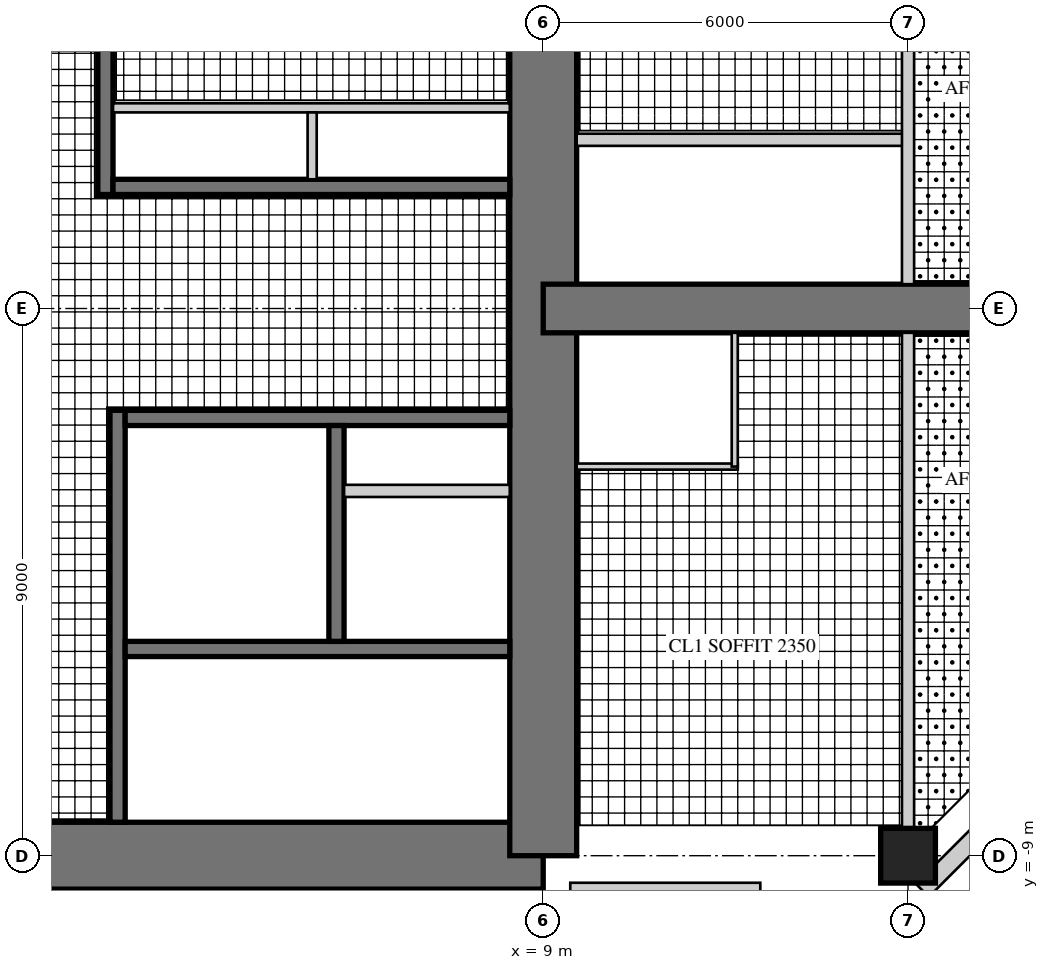
"""IFC4 building model, lengths in metres.
Left out: names, types, materials, properties, quantities, classifications, styles, units other than length and angle.
Written with IfcOpenShell. Run it as: python <this file> out.ifc"""

import sys

from ifc_helpers import new_model, si_unit, direction, frame, frame_2d, origin, origin_2d, place, context, subcontext, project, spatial, rectangle, hollow_rectangle, extrude, element, fill, save


model = new_model("IFC4")
c1 = context("Model", 3, precision=1e-05, world=origin(), true_north=direction((0.0, 1.0)))
c2 = subcontext(c1, "Body", "Model", "MODEL_VIEW")
j1 = project(units=[si_unit("LENGTHUNIT", "METRE"), si_unit("PLANEANGLEUNIT", "RADIAN")], contexts=[c1])
p1 = place(None, origin())
s1 = spatial("IfcSite", under=j1, at=p1, CompositionType="ELEMENT")
p2 = place(p1, origin())
s2 = spatial("IfcBuilding", under=s1, at=p2, CompositionType="ELEMENT")
p3 = place(p2, frame((0.0, 0.0, 189.9)))
s3 = spatial("IfcBuildingStorey", under=s2, at=p3, CompositionType="ELEMENT", Elevation=189.9)
p4 = place(p3, frame((-9.0, -9.0, 0.0), z_axis=(0.0, 0.0, 1.0), x_axis=(1.0, 0.0, 0.0)))
e1 = element("IfcWall", 1, at=p4, inside=s3, PredefinedType="SHEAR", context=c2, shape_type="SweptSolid", body=[
    extrude(rectangle(XDim=18.0, YDim=1.1, at=frame_2d((9.0, 0.0))), origin(), (0.0, 0.0, 1.0), 3.4),
])
p5 = place(p4, frame((9.8, 0.0, 0.0)))
e2 = element("IfcOpeningElement", 2, at=p5, cuts=e1, PredefinedType="OPENING", context=c2, shape_type="SweptSolid", body=[
    extrude(rectangle(XDim=1.0, YDim=2.4, at=frame_2d((0.5, 1.2))), frame((0.0, 0.56, 0.0), z_axis=(0.0, -1.0, 0.0), x_axis=(1.0, 0.0, 0.0)), (0.0, 0.0, 1.0), 1.12),
])
p6 = place(p3, frame((9.0, -9.0, 0.0), z_axis=(0.0, 0.0, 1.0), x_axis=(0.0, 1.0, 0.0)))
e3 = element("IfcWall", 3, at=p6, inside=s3, PredefinedType="SHEAR", context=c2, shape_type="SweptSolid", body=[
    extrude(rectangle(XDim=18.0, YDim=1.1, at=frame_2d((9.0, 0.0))), origin(), (0.0, 0.0, 1.0), 3.4),
])
p7 = place(p6, frame((9.8, 0.0, 0.0)))
e4 = element("IfcOpeningElement", 4, at=p7, cuts=e3, PredefinedType="OPENING", context=c2, shape_type="SweptSolid", body=[
    extrude(rectangle(XDim=1.0, YDim=2.4, at=frame_2d((0.5, 1.2))), frame((0.0, 0.56, 0.0), z_axis=(0.0, -1.0, 0.0), x_axis=(1.0, 0.0, 0.0)), (0.0, 0.0, 1.0), 1.12),
])
p8 = place(p3, frame((1.8, 1.875, 0.0), z_axis=(0.0, 0.0, 1.0), x_axis=(0.0, 1.0, 0.0)))
e5 = element("IfcWall", 5, at=p8, inside=s3, PredefinedType="SHEAR", context=c2, shape_type="SweptSolid", body=[
    extrude(rectangle(XDim=6.575, YDim=0.25, at=frame_2d((3.288, 0.0))), origin(), (0.0, 0.0, 1.0), 3.4),
])
p9 = place(p8, frame((1.875, 0.0, 0.0)))
e6 = element("IfcOpeningElement", 6, at=p9, cuts=e5, PredefinedType="OPENING", context=c2, shape_type="SweptSolid", body=[
    extrude(rectangle(XDim=1.6, YDim=2.4, at=frame_2d((0.8, 1.2))), frame((0.0, 0.135, 0.0), z_axis=(0.0, -1.0, 0.0), x_axis=(1.0, 0.0, 0.0)), (0.0, 0.0, 1.0), 0.27),
])
p10 = place(p3, frame((1.925, 2.0, 0.0), z_axis=(0.0, 0.0, 1.0), x_axis=(1.0, 0.0, 0.0)))
e7 = element("IfcWall", 7, at=p10, inside=s3, PredefinedType="SHEAR", context=c2, shape_type="SweptSolid", body=[
    extrude(rectangle(XDim=6.525, YDim=0.25, at=frame_2d((3.262, 0.0))), origin(), (0.0, 0.0, 1.0), 3.4),
])
p11 = place(p3, frame((1.925, 3.3, 0.0), z_axis=(0.0, 0.0, 1.0), x_axis=(1.0, 0.0, 0.0)))
e8 = element("IfcWall", 8, at=p11, inside=s3, PredefinedType="PARTITIONING", context=c2, shape_type="SweptSolid", body=[
    extrude(rectangle(XDim=6.525, YDim=0.15, at=frame_2d((3.262, 0.0))), origin(), (0.0, 0.0, 1.0), 3.4),
])
p12 = place(p11, frame((0.075, 0.0, 0.0)))
e9 = element("IfcOpeningElement", 9, at=p12, cuts=e8, PredefinedType="OPENING", context=c2, shape_type="SweptSolid", body=[
    extrude(rectangle(XDim=0.8, YDim=2.1, at=frame_2d((0.4, 1.05))), frame((0.0, 0.085, 0.0), z_axis=(0.0, -1.0, 0.0), x_axis=(1.0, 0.0, 0.0)), (0.0, 0.0, 1.0), 0.17),
])
p13 = place(p11, frame((3.675, 0.0, 0.0)))
e10 = element("IfcOpeningElement", 10, at=p13, cuts=e8, PredefinedType="OPENING", context=c2, shape_type="SweptSolid", body=[
    extrude(rectangle(XDim=0.8, YDim=2.1, at=frame_2d((0.4, 1.05))), frame((0.0, 0.085, 0.0), z_axis=(0.0, -1.0, 0.0), x_axis=(1.0, 0.0, 0.0)), (0.0, 0.0, 1.0), 0.17),
])
p14 = place(p3, frame((5.2, 2.125, 0.0), z_axis=(0.0, 0.0, 1.0), x_axis=(0.0, 1.0, 0.0)))
e11 = element("IfcWall", 11, at=p14, inside=s3, PredefinedType="PARTITIONING", context=c2, shape_type="SweptSolid", body=[
    extrude(rectangle(XDim=1.1, YDim=0.15, at=frame_2d((0.55, 0.0))), origin(), (0.0, 0.0, 1.0), 3.4),
])
p15 = place(p3, frame((2.0, -1.675, 0.0), z_axis=(0.0, 0.0, 1.0), x_axis=(0.0, -1.0, 0.0)))
e12 = element("IfcWall", 12, at=p15, inside=s3, PredefinedType="SHEAR", context=c2, shape_type="SweptSolid", body=[
    extrude(rectangle(XDim=6.775, YDim=0.25, at=frame_2d((3.387, 0.0))), origin(), (0.0, 0.0, 1.0), 3.4),
])
p16 = place(p15, frame((0.725, 0.0, 0.0)))
e13 = element("IfcOpeningElement", 13, at=p16, cuts=e12, PredefinedType="OPENING", context=c2, shape_type="SweptSolid", body=[
    extrude(rectangle(XDim=1.0, YDim=2.1, at=frame_2d((0.5, 1.05))), frame((0.0, 0.135, 0.0), z_axis=(0.0, -1.0, 0.0), x_axis=(1.0, 0.0, 0.0)), (0.0, 0.0, 1.0), 0.27),
])
p17 = place(p3, frame((2.125, -1.8, 0.0), z_axis=(0.0, 0.0, 1.0), x_axis=(1.0, 0.0, 0.0)))
e14 = element("IfcWall", 14, at=p17, inside=s3, PredefinedType="SHEAR", context=c2, shape_type="SweptSolid", body=[
    extrude(rectangle(XDim=6.325, YDim=0.25, at=frame_2d((3.163, 0.0))), origin(), (0.0, 0.0, 1.0), 3.4),
])
p18 = place(p3, frame((2.125, -5.6, 0.0), z_axis=(0.0, 0.0, 1.0), x_axis=(1.0, 0.0, 0.0)))
e15 = element("IfcWall", 15, at=p18, inside=s3, PredefinedType="SHEAR", context=c2, shape_type="SweptSolid", body=[
    extrude(rectangle(XDim=6.325, YDim=0.25, at=frame_2d((3.163, 0.0))), origin(), (0.0, 0.0, 1.0), 3.4),
])
p19 = place(p18, frame((0.175, 0.0, 0.0)))
e16 = element("IfcOpeningElement", 16, at=p19, cuts=e15, PredefinedType="OPENING", context=c2, shape_type="SweptSolid", body=[
    extrude(rectangle(XDim=1.0, YDim=2.1, at=frame_2d((0.5, 1.05))), frame((0.0, 0.135, 0.0), z_axis=(0.0, -1.0, 0.0), x_axis=(1.0, 0.0, 0.0)), (0.0, 0.0, 1.0), 0.27),
])
p20 = place(p3, frame((5.6, -1.925, 0.0), z_axis=(0.0, 0.0, 1.0), x_axis=(0.0, -1.0, 0.0)))
e17 = element("IfcWall", 17, at=p20, inside=s3, PredefinedType="SHEAR", context=c2, shape_type="SweptSolid", body=[
    extrude(rectangle(XDim=3.55, YDim=0.25, at=frame_2d((1.775, 0.0))), origin(), (0.0, 0.0, 1.0), 3.4),
])
p21 = place(p20, frame((1.525, 0.0, 0.0)))
e18 = element("IfcOpeningElement", 18, at=p21, cuts=e17, PredefinedType="OPENING", context=c2, shape_type="SweptSolid", body=[
    extrude(rectangle(XDim=1.1, YDim=2.2, at=frame_2d((0.55, 1.1))), frame((0.0, 0.135, 0.0), z_axis=(0.0, -1.0, 0.0), x_axis=(1.0, 0.0, 0.0)), (0.0, 0.0, 1.0), 0.27),
])
p22 = place(p20, frame((0.075, 0.0, 0.0)))
e19 = element("IfcOpeningElement", 19, at=p22, cuts=e17, PredefinedType="OPENING", context=c2, shape_type="SweptSolid", body=[
    extrude(rectangle(XDim=0.8, YDim=2.1, at=frame_2d((0.4, 1.05))), frame((0.0, 0.135, 0.0), z_axis=(0.0, -1.0, 0.0), x_axis=(1.0, 0.0, 0.0)), (0.0, 0.0, 1.0), 0.27),
])
p23 = place(p3, frame((5.725, -3.0, 0.0), z_axis=(0.0, 0.0, 1.0), x_axis=(1.0, 0.0, 0.0)))
e20 = element("IfcWall", 20, at=p23, inside=s3, PredefinedType="PARTITIONING", context=c2, shape_type="SweptSolid", body=[
    extrude(rectangle(XDim=2.725, YDim=0.2, at=frame_2d((1.362, 0.0))), origin(), (0.0, 0.0, 1.0), 3.4),
])
p24 = place(p3, frame((9.0, 0.0, 0.0), z_axis=(0.0, 0.0, 1.0), x_axis=(1.0, 0.0, 0.0)))
e21 = element("IfcWall", 21, at=p24, inside=s3, PredefinedType="SHEAR", context=c2, shape_type="SweptSolid", body=[
    extrude(rectangle(XDim=9.0, YDim=0.8, at=frame_2d((4.5, 0.0))), origin(), (0.0, 0.0, 1.0), 3.4),
])
p25 = place(p24, frame((3.95, 0.0, 0.0)))
e22 = element("IfcOpeningElement", 22, at=p25, cuts=e21, PredefinedType="OPENING", context=c2, shape_type="SweptSolid", body=[
    extrude(rectangle(XDim=1.0, YDim=2.15, at=frame_2d((0.5, 1.075))), frame((0.0, 0.41, 0.0), z_axis=(0.0, -1.0, 0.0), x_axis=(1.0, 0.0, 0.0)), (0.0, 0.0, 1.0), 0.82),
])
p26 = place(p24, frame((7.0, 0.0, 0.0)))
e23 = element("IfcOpeningElement", 23, at=p26, cuts=e21, PredefinedType="OPENING", context=c2, shape_type="SweptSolid", body=[
    extrude(rectangle(XDim=1.0, YDim=2.2, at=frame_2d((0.5, 1.1))), frame((0.0, 0.41, 0.0), z_axis=(0.0, -1.0, 0.0), x_axis=(1.0, 0.0, 0.0)), (0.0, 0.0, 1.0), 0.82),
])
p27 = place(p3, frame((15.0, -9.0, 0.0), z_axis=(0.0, 0.0, 1.0), x_axis=(1.0, 0.0, 0.0)))
e24 = element("IfcColumn", 24, at=p27, inside=s3, PredefinedType="COLUMN", context=c2, shape_type="SweptSolid", body=[
    extrude(rectangle(XDim=0.9, YDim=0.9, at=origin_2d()), origin(), (0.0, 0.0, 1.0), 3.4),
])
p28 = place(p3, frame((9.445, -9.57, 0.0), z_axis=(0.0, 0.0, 1.0), x_axis=(1.0, 0.0, 0.0)))
e25 = element("IfcWall", 25, at=p28, inside=s3, PredefinedType="SOLIDWALL", context=c2, shape_type="SweptSolid", body=[
    extrude(rectangle(XDim=3.125, YDim=0.25, at=frame_2d((1.562, 0.0))), origin(), (0.0, 0.0, 1.0), 3.22),
])
p29 = place(p28, frame((0.6, 0.0, 0.0)))
e26 = element("IfcOpeningElement", 26, at=p29, cuts=e25, PredefinedType="OPENING", context=c2, shape_type="SweptSolid", body=[
    extrude(rectangle(XDim=1.0, YDim=2.2, at=frame_2d((0.5, 1.1))), frame((0.0, 0.135, 0.0), z_axis=(0.0, -1.0, 0.0), x_axis=(1.0, 0.0, 0.0)), (0.0, 0.0, 1.0), 0.27),
])
p30 = place(p3, frame((15.236, -9.57, 0.0), z_axis=(0.0, 0.0, 1.0), x_axis=(0.707106781187, 0.707106781187, 0.0)))
e27 = element("IfcWall", 27, at=p30, inside=s3, PredefinedType="SOLIDWALL", context=c2, shape_type="SweptSolid", body=[
    extrude(rectangle(XDim=4.715, YDim=0.3, at=frame_2d((2.357, 0.0))), origin(), (0.0, 0.0, 1.0), 3.22),
])
p31 = place(p30, frame((1.907, 0.0, 0.3)))
e28 = element("IfcOpeningElement", 28, at=p31, cuts=e27, PredefinedType="OPENING", context=c2, shape_type="SweptSolid", body=[
    extrude(rectangle(XDim=0.9, YDim=2.4, at=frame_2d((0.45, 1.2))), frame((0.0, 0.16, 0.0), z_axis=(0.0, -1.0, 0.0), x_axis=(1.0, 0.0, 0.0)), (0.0, 0.0, 1.0), 0.32),
])
p32 = place(p3, frame((9.55, -2.6, 0.0), z_axis=(0.0, 0.0, 1.0), x_axis=(1.0, 0.0, 0.0)))
e29 = element("IfcWall", 29, at=p32, inside=s3, PredefinedType="PARTITIONING", context=c2, shape_type="SweptSolid", body=[
    extrude(rectangle(XDim=2.65, YDim=0.1, at=frame_2d((1.325, 0.0))), origin(), (0.0, 0.0, 1.0), 3.22),
])
p33 = place(p3, frame((12.15, -2.6, 0.0), z_axis=(0.0, 0.0, 1.0), x_axis=(0.0, 1.0, 0.0)))
e30 = element("IfcWall", 30, at=p33, inside=s3, PredefinedType="PARTITIONING", context=c2, shape_type="SweptSolid", body=[
    extrude(rectangle(XDim=2.2, YDim=0.1, at=frame_2d((1.1, 0.0))), origin(), (0.0, 0.0, 1.0), 3.22),
])
p34 = place(p33, frame((0.55, 0.0, 0.0)))
e31 = element("IfcOpeningElement", 31, at=p34, cuts=e30, PredefinedType="OPENING", context=c2, shape_type="SweptSolid", body=[
    extrude(rectangle(XDim=0.9, YDim=2.1, at=frame_2d((0.45, 1.05))), frame((0.0, 0.06, 0.0), z_axis=(0.0, -1.0, 0.0), x_axis=(1.0, 0.0, 0.0)), (0.0, 0.0, 1.0), 0.12),
])
p35 = place(p3, frame((9.55, 2.775, 0.0), z_axis=(0.0, 0.0, 1.0), x_axis=(1.0, 0.0, 0.0)))
e32 = element("IfcWall", 32, at=p35, inside=s3, PredefinedType="SOLIDWALL", context=c2, shape_type="SweptSolid", body=[
    extrude(rectangle(XDim=5.45, YDim=0.2, at=frame_2d((2.725, 0.0))), origin(), (0.0, 0.0, 1.0), 3.22),
])
p36 = place(p35, frame((1.2, 0.0, 0.0)))
e33 = element("IfcOpeningElement", 33, at=p36, cuts=e32, PredefinedType="OPENING", context=c2, shape_type="SweptSolid", body=[
    extrude(rectangle(XDim=1.0, YDim=2.2, at=frame_2d((0.5, 1.1))), frame((0.0, 0.11, 0.0), z_axis=(0.0, -1.0, 0.0), x_axis=(1.0, 0.0, 0.0)), (0.0, 0.0, 1.0), 0.22),
])
p37 = place(p3, frame((15.0, -8.55, 0.0), z_axis=(0.0, 0.0, 1.0), x_axis=(0.0, 1.0, 0.0)))
e34 = element("IfcWall", 34, at=p37, inside=s3, PredefinedType="SOLIDWALL", context=c2, shape_type="SweptSolid", body=[
    extrude(rectangle(XDim=8.15, YDim=0.2, at=frame_2d((4.075, 0.0))), origin(), (0.0, 0.0, 1.0), 2.47),
])
p38 = place(p3, frame((15.0, 0.4, 0.0), z_axis=(0.0, 0.0, 1.0), x_axis=(0.0, 1.0, 0.0)))
e35 = element("IfcWall", 35, at=p38, inside=s3, PredefinedType="SOLIDWALL", context=c2, shape_type="SweptSolid", body=[
    extrude(rectangle(XDim=8.15, YDim=0.2, at=frame_2d((4.075, 0.0))), origin(), (0.0, 0.0, 1.0), 2.47),
])
p39 = place(p38, frame((0.4, 0.0, 0.0)))
e36 = element("IfcOpeningElement", 36, at=p39, cuts=e35, PredefinedType="OPENING", context=c2, shape_type="SweptSolid", body=[
    extrude(rectangle(XDim=1.0, YDim=2.2, at=frame_2d((0.5, 1.1))), frame((0.0, 0.11, 0.0), z_axis=(0.0, -1.0, 0.0), x_axis=(1.0, 0.0, 0.0)), (0.0, 0.0, 1.0), 0.22),
])
p40 = place(p3, frame((5.475, -9.55, 0.0), z_axis=(0.0, 0.0, 1.0), x_axis=(0.0, -1.0, 0.0)))
e37 = element("IfcWall", 37, at=p40, inside=s3, PredefinedType="PARTITIONING", context=c2, shape_type="SweptSolid", body=[
    extrude(rectangle(XDim=2.85, YDim=0.1, at=frame_2d((1.425, 0.0))), origin(), (0.0, 0.0, 1.0), 3.22),
])
p41 = place(p29, origin())
e38 = element("IfcDoor", 38, at=p41, inside=s3, OperationType="SINGLE_SWING_LEFT", PredefinedType="DOOR", context=c2, shape_type="SweptSolid", body=[
    extrude(hollow_rectangle(XDim=1.0, YDim=2.2, WallThickness=0.06, at=frame_2d((0.5, 1.1))), frame((0.0, 0.025, 0.0), z_axis=(0.0, -1.0, 0.0), x_axis=(1.0, 0.0, 0.0)), (0.0, 0.0, 1.0), 0.05),
    extrude(rectangle(XDim=0.879, YDim=2.079, at=frame_2d((0.5, 1.1))), frame((0.0, 0.025, 0.0), z_axis=(0.0, -1.0, 0.0), x_axis=(1.0, 0.0, 0.0)), (0.0, 0.0, 1.0), 0.05),
])
fill(e26, e38)
p42 = place(p34, origin())
e39 = element("IfcDoor", 39, at=p42, inside=s3, OperationType="SINGLE_SWING_LEFT", PredefinedType="DOOR", context=c2, shape_type="SweptSolid", body=[
    extrude(rectangle(XDim=0.9, YDim=2.1, at=frame_2d((0.45, 1.05))), frame((0.0, 0.025, 0.0), z_axis=(0.0, -1.0, 0.0), x_axis=(1.0, 0.0, 0.0)), (0.0, 0.0, 1.0), 0.05),
])
fill(e31, e39)
p43 = place(p36, origin())
e40 = element("IfcDoor", 40, at=p43, inside=s3, OperationType="SINGLE_SWING_LEFT", PredefinedType="DOOR", context=c2, shape_type="SweptSolid", body=[
    extrude(rectangle(XDim=1.0, YDim=2.2, at=frame_2d((0.5, 1.1))), frame((0.0, 0.025, 0.0), z_axis=(0.0, -1.0, 0.0), x_axis=(1.0, 0.0, 0.0)), (0.0, 0.0, 1.0), 0.05),
])
fill(e33, e40)
p44 = place(p39, frame((1.0, 0.0, 0.0), z_axis=(0.0, 0.0, 1.0), x_axis=(-1.0, 0.0, 0.0)))
e41 = element("IfcDoor", 41, at=p44, inside=s3, OperationType="SINGLE_SWING_LEFT", PredefinedType="DOOR", context=c2, shape_type="SweptSolid", body=[
    extrude(rectangle(XDim=1.0, YDim=2.2, at=frame_2d((0.5, 1.1))), frame((0.0, 0.025, 0.0), z_axis=(0.0, -1.0, 0.0), x_axis=(1.0, 0.0, 0.0)), (0.0, 0.0, 1.0), 0.05),
])
fill(e36, e41)
p45 = place(p25, frame((1.0, 0.0, 0.0), z_axis=(0.0, 0.0, 1.0), x_axis=(-1.0, 0.0, 0.0)))
e42 = element("IfcDoor", 42, at=p45, inside=s3, OperationType="SINGLE_SWING_RIGHT", PredefinedType="DOOR", context=c2, shape_type="SweptSolid", body=[
    extrude(rectangle(XDim=1.0, YDim=2.15, at=frame_2d((0.5, 1.075))), frame((0.0, 0.025, 0.0), z_axis=(0.0, -1.0, 0.0), x_axis=(1.0, 0.0, 0.0)), (0.0, 0.0, 1.0), 0.05),
])
fill(e22, e42)
p46 = place(p5, origin())
e43 = element("IfcDoor", 43, at=p46, inside=s3, OperationType="SINGLE_SWING_RIGHT", PredefinedType="DOOR", context=c2, shape_type="SweptSolid", body=[
    extrude(rectangle(XDim=1.0, YDim=2.4, at=frame_2d((0.5, 1.2))), frame((0.0, 0.055, 0.0), z_axis=(0.0, -1.0, 0.0), x_axis=(1.0, 0.0, 0.0)), (0.0, 0.0, 1.0), 0.05),
])
fill(e2, e43)
p47 = place(p7, origin())
e44 = element("IfcDoor", 44, at=p47, inside=s3, OperationType="SINGLE_SWING_RIGHT", PredefinedType="DOOR", context=c2, shape_type="SweptSolid", body=[
    extrude(rectangle(XDim=1.0, YDim=2.4, at=frame_2d((0.5, 1.2))), frame((0.0, 0.055, 0.0), z_axis=(0.0, -1.0, 0.0), x_axis=(1.0, 0.0, 0.0)), (0.0, 0.0, 1.0), 0.05),
])
fill(e4, e44)
p48 = place(p9, frame((1.6, 0.0, 0.0), z_axis=(0.0, 0.0, 1.0), x_axis=(-1.0, 0.0, 0.0)))
e45 = element("IfcDoor", 45, at=p48, inside=s3, OperationType="DOUBLE_DOOR_SINGLE_SWING", PredefinedType="DOOR", context=c2, shape_type="SweptSolid", body=[
    extrude(rectangle(XDim=1.6, YDim=2.4, at=frame_2d((0.8, 1.2))), frame((0.0, 0.025, 0.0), z_axis=(0.0, -1.0, 0.0), x_axis=(1.0, 0.0, 0.0)), (0.0, 0.0, 1.0), 0.05),
])
fill(e6, e45)
p49 = place(p12, frame((0.8, 0.0, 0.0), z_axis=(0.0, 0.0, 1.0), x_axis=(-1.0, 0.0, 0.0)))
e46 = element("IfcDoor", 46, at=p49, inside=s3, OperationType="SINGLE_SWING_RIGHT", PredefinedType="DOOR", context=c2, shape_type="SweptSolid", body=[
    extrude(rectangle(XDim=0.8, YDim=2.1, at=frame_2d((0.4, 1.05))), frame((0.0, 0.025, 0.0), z_axis=(0.0, -1.0, 0.0), x_axis=(1.0, 0.0, 0.0)), (0.0, 0.0, 1.0), 0.05),
])
fill(e9, e46)
p50 = place(p13, frame((0.8, 0.0, 0.0), z_axis=(0.0, 0.0, 1.0), x_axis=(-1.0, 0.0, 0.0)))
e47 = element("IfcDoor", 47, at=p50, inside=s3, OperationType="SINGLE_SWING_RIGHT", PredefinedType="DOOR", context=c2, shape_type="SweptSolid", body=[
    extrude(rectangle(XDim=0.8, YDim=2.1, at=frame_2d((0.4, 1.05))), frame((0.0, 0.025, 0.0), z_axis=(0.0, -1.0, 0.0), x_axis=(1.0, 0.0, 0.0)), (0.0, 0.0, 1.0), 0.05),
])
fill(e10, e47)
p51 = place(p16, origin())
e48 = element("IfcDoor", 48, at=p51, inside=s3, OperationType="SINGLE_SWING_LEFT", PredefinedType="DOOR", context=c2, shape_type="SweptSolid", body=[
    extrude(rectangle(XDim=1.0, YDim=2.1, at=frame_2d((0.5, 1.05))), frame((0.0, 0.025, 0.0), z_axis=(0.0, -1.0, 0.0), x_axis=(1.0, 0.0, 0.0)), (0.0, 0.0, 1.0), 0.05),
])
fill(e13, e48)
p52 = place(p19, frame((1.0, 0.0, 0.0), z_axis=(0.0, 0.0, 1.0), x_axis=(-1.0, 0.0, 0.0)))
e49 = element("IfcDoor", 49, at=p52, inside=s3, OperationType="SINGLE_SWING_RIGHT", PredefinedType="DOOR", context=c2, shape_type="SweptSolid", body=[
    extrude(rectangle(XDim=1.0, YDim=2.1, at=frame_2d((0.5, 1.05))), frame((0.0, 0.025, 0.0), z_axis=(0.0, -1.0, 0.0), x_axis=(1.0, 0.0, 0.0)), (0.0, 0.0, 1.0), 0.05),
])
fill(e16, e49)
p53 = place(p21, origin())
e50 = element("IfcDoor", 50, at=p53, inside=s3, OperationType="DOUBLE_DOOR_SLIDING", PredefinedType="DOOR", context=c2, shape_type="SweptSolid", body=[
    extrude(rectangle(XDim=1.1, YDim=2.2, at=frame_2d((0.55, 1.1))), frame((0.0, 0.025, 0.0), z_axis=(0.0, -1.0, 0.0), x_axis=(1.0, 0.0, 0.0)), (0.0, 0.0, 1.0), 0.05),
])
fill(e18, e50)
p54 = place(p22, origin())
e51 = element("IfcDoor", 51, at=p54, inside=s3, OperationType="SINGLE_SWING_LEFT", PredefinedType="DOOR", context=c2, shape_type="SweptSolid", body=[
    extrude(rectangle(XDim=0.8, YDim=2.1, at=frame_2d((0.4, 1.05))), frame((0.0, 0.025, 0.0), z_axis=(0.0, -1.0, 0.0), x_axis=(1.0, 0.0, 0.0)), (0.0, 0.0, 1.0), 0.05),
])
fill(e19, e51)
save(model, sys.argv[1])
